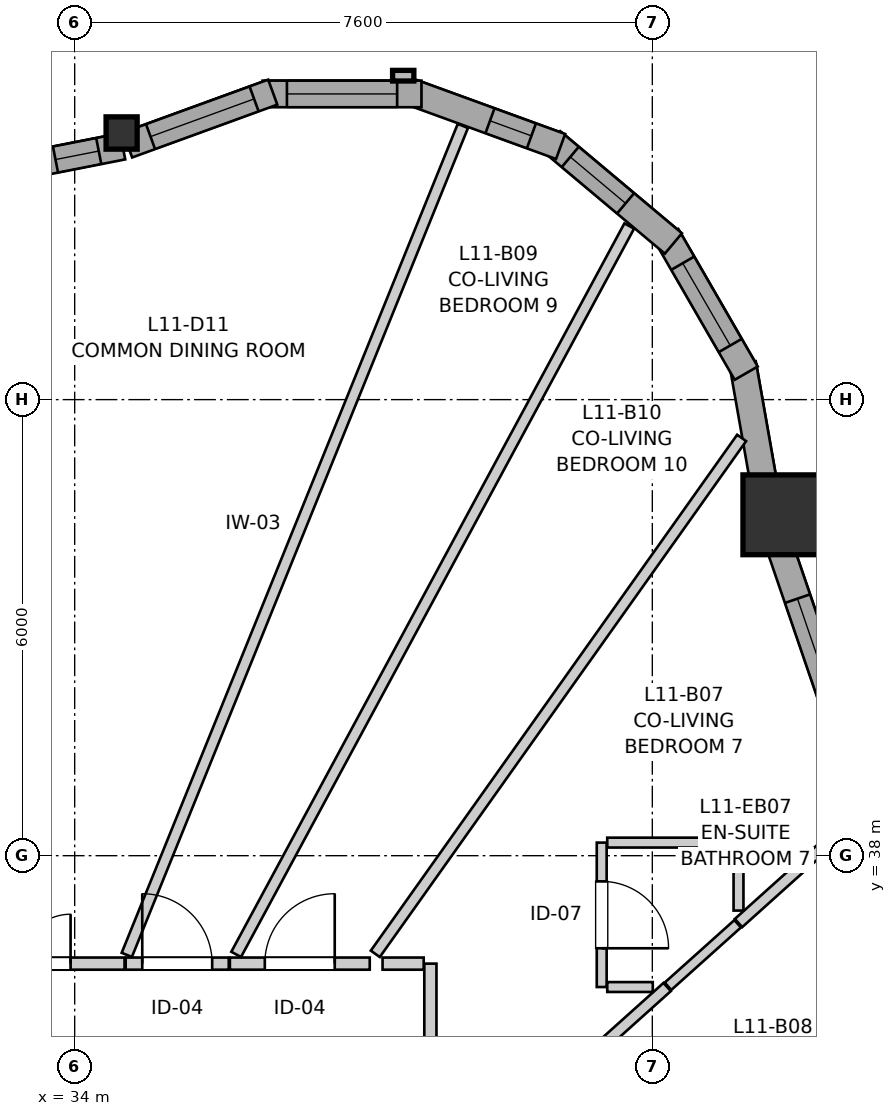
"""IFC4 building model, lengths in metres.
Left out: names, types, materials, properties, quantities, classifications, styles, units other than length and angle.
Written with IfcOpenShell. Run it as: python <this file> out.ifc"""

import sys

from ifc_helpers import new_model, si_unit, direction, frame, frame_2d, origin, origin_2d, place, context, subcontext, project, spatial, rectangle, i_section, extrude, source, transform, mapped, element, fill, save


model = new_model("IFC4")
c1 = context("Model", 3, precision=1e-05, world=origin(), true_north=direction((0.0, 1.0)))
c2 = subcontext(c1, "Body", "Model", "MODEL_VIEW")
j1 = project(units=[si_unit("LENGTHUNIT", "METRE"), si_unit("PLANEANGLEUNIT", "RADIAN")], contexts=[c1])
p1 = place(None, origin())
s1 = spatial("IfcSite", under=j1, at=p1, CompositionType="ELEMENT")
p2 = place(p1, origin())
s2 = spatial("IfcBuilding", under=s1, at=p2, CompositionType="ELEMENT")
p3 = place(p2, frame((0.0, 0.0, 39.8)))
s3 = spatial("IfcBuildingStorey", under=s2, at=p3, CompositionType="ELEMENT", Elevation=39.8)
m1 = source(origin(), c2, "Body", "SweptSolid", [
    extrude(rectangle(XDim=1.05, YDim=1.05, at=origin_2d()), origin(), (0.0, 0.0, 1.0), 2.94),
])
p4 = place(p3, frame((43.317, 42.485, 0.0), z_axis=(0.0, 0.0, 1.0), x_axis=(1.0, 0.0, 0.0)))
e1 = element("IfcColumn", 1, at=p4, inside=s3, PredefinedType="COLUMN", context=c2, shape_type="MappedRepresentation", body=[
    mapped(m1, transform((0.0, 0.0, 0.0), x_axis=(1.0, 0.0, 0.0), y_axis=(0.0, 1.0, 0.0), z_axis=(0.0, 0.0, 1.0), scale=1.0)),
])
m2 = source(origin(), c2, "Body", "SweptSolid", [
    extrude(i_section(OverallWidth=0.409, OverallDepth=0.425, WebThickness=0.03, FlangeThickness=0.048, FilletRadius=0.015, at=origin_2d()), origin(), (0.0, 0.0, 1.0), 2.94),
])
p5 = place(p3, frame((34.617, 47.508, 0.0), z_axis=(0.0, 0.0, 1.0), x_axis=(1.0, 0.0, 0.0)))
e2 = element("IfcColumn", 2, at=p5, inside=s3, PredefinedType="PILASTER", context=c2, shape_type="MappedRepresentation", body=[
    mapped(m2, transform((0.0, 0.0, 0.0), x_axis=(1.0, 0.0, 0.0), y_axis=(0.0, 1.0, 0.0), z_axis=(0.0, 0.0, 1.0), scale=1.0)),
])
p6 = place(p3, frame((44.292, 39.095, 0.0), z_axis=(0.0, 0.0, 1.0), x_axis=(-0.323582370233, 0.946200005112, 0.0)))
e3 = element("IfcWall", 3, at=p6, inside=s3, PredefinedType="SOLIDWALL", context=c2, shape_type="SweptSolid", body=[
    extrude(rectangle(XDim=3.222, YDim=0.35, at=frame_2d((1.611, 0.0))), origin(), (0.0, 0.0, 1.0), 2.42),
])
p7 = place(p6, frame((0.816, 0.0, 0.82)))
e4 = element("IfcOpeningElement", 4, at=p7, cuts=e3, PredefinedType="OPENING", context=c2, shape_type="SweptSolid", body=[
    extrude(rectangle(XDim=1.6, YDim=1.35, at=frame_2d((0.8, 0.675))), frame((0.0, 0.185, 0.0), z_axis=(0.0, -1.0, 0.0), x_axis=(1.0, 0.0, 0.0)), (0.0, 0.0, 1.0), 0.37),
])
p8 = place(p3, frame((43.093, 42.75, 0.0), z_axis=(0.0, 0.0, 1.0), x_axis=(-0.173610462023, 0.984814402553, 0.0)))
e5 = element("IfcWall", 5, at=p8, inside=s3, PredefinedType="SOLIDWALL", context=c2, shape_type="SweptSolid", body=[
    extrude(rectangle(XDim=1.752, YDim=0.35, at=frame_2d((0.876, 0.0))), origin(), (0.0, 0.0, 1.0), 2.42),
])
p9 = place(p3, frame((42.835, 44.348, 0.0), z_axis=(0.0, 0.0, 1.0), x_axis=(-0.499995423472, 0.866028046028, 0.0)))
e6 = element("IfcWall", 6, at=p9, inside=s3, PredefinedType="SOLIDWALL", context=c2, shape_type="SweptSolid", body=[
    extrude(rectangle(XDim=2.09, YDim=0.35, at=frame_2d((1.045, 0.0))), origin(), (0.0, 0.0, 1.0), 2.42),
])
p10 = place(p9, frame((0.42, 0.0, 0.82)))
e7 = element("IfcOpeningElement", 7, at=p10, cuts=e6, PredefinedType="OPENING", context=c2, shape_type="SweptSolid", body=[
    extrude(rectangle(XDim=1.25, YDim=1.35, at=frame_2d((0.625, 0.675))), frame((0.0, 0.185, 0.0), z_axis=(0.0, -1.0, 0.0), x_axis=(1.0, 0.0, 0.0)), (0.0, 0.0, 1.0), 0.37),
])
p11 = place(p3, frame((41.877, 46.054, 0.0), z_axis=(0.0, 0.0, 1.0), x_axis=(-0.766024572719, 0.642811289563, 0.0)))
e8 = element("IfcWall", 8, at=p11, inside=s3, PredefinedType="SOLIDWALL", context=c2, shape_type="SweptSolid", body=[
    extrude(rectangle(XDim=2.09, YDim=0.35, at=frame_2d((1.045, 0.0))), origin(), (0.0, 0.0, 1.0), 2.42),
])
p12 = place(p11, frame((0.821, 0.0, 0.82)))
e9 = element("IfcOpeningElement", 9, at=p12, cuts=e8, PredefinedType="OPENING", context=c2, shape_type="SweptSolid", body=[
    extrude(rectangle(XDim=0.95, YDim=1.35, at=frame_2d((0.475, 0.675))), frame((0.0, 0.185, 0.0), z_axis=(0.0, -1.0, 0.0), x_axis=(1.0, 0.0, 0.0)), (0.0, 0.0, 1.0), 0.37),
])
p13 = place(p3, frame((40.393, 47.33, 0.0), z_axis=(0.0, 0.0, 1.0), x_axis=(-0.939660353162, 0.342108784886, 0.0)))
e10 = element("IfcWall", 10, at=p13, inside=s3, PredefinedType="SOLIDWALL", context=c2, shape_type="SweptSolid", body=[
    extrude(rectangle(XDim=2.09, YDim=0.35, at=frame_2d((1.045, 0.0))), origin(), (0.0, 0.0, 1.0), 2.42),
])
p14 = place(p13, frame((0.409, 0.0, 0.82)))
e11 = element("IfcOpeningElement", 11, at=p14, cuts=e10, PredefinedType="OPENING", context=c2, shape_type="SweptSolid", body=[
    extrude(rectangle(XDim=0.58, YDim=1.35, at=frame_2d((0.29, 0.675))), frame((0.0, 0.185, 0.0), z_axis=(0.0, -1.0, 0.0), x_axis=(1.0, 0.0, 0.0)), (0.0, 0.0, 1.0), 0.37),
])
p15 = place(p3, frame((38.563, 48.022, 0.0), z_axis=(0.0, 0.0, 1.0), x_axis=(-1.0, 0.0, 0.0)))
e12 = element("IfcWall", 12, at=p15, inside=s3, PredefinedType="SOLIDWALL", context=c2, shape_type="SweptSolid", body=[
    extrude(rectangle(XDim=2.09, YDim=0.35, at=frame_2d((1.045, 0.0))), origin(), (0.0, 0.0, 1.0), 2.42),
])
p16 = place(p15, frame((0.32, 0.0, 0.82)))
e13 = element("IfcOpeningElement", 13, at=p16, cuts=e12, PredefinedType="OPENING", context=c2, shape_type="SweptSolid", body=[
    extrude(rectangle(XDim=1.45, YDim=1.25, at=frame_2d((0.725, 0.625))), frame((0.0, 0.185, 0.0), z_axis=(0.0, -1.0, 0.0), x_axis=(1.0, 0.0, 0.0)), (0.0, 0.0, 1.0), 0.37),
])
p17 = place(p3, frame((36.606, 48.045, 0.0), z_axis=(0.0, 0.0, 1.0), x_axis=(-0.939653047052, -0.342128851701, 0.0)))
e14 = element("IfcWall", 14, at=p17, inside=s3, PredefinedType="SOLIDWALL", context=c2, shape_type="SweptSolid", body=[
    extrude(rectangle(XDim=2.032, YDim=0.35, at=frame_2d((1.016, 0.0))), origin(), (0.0, 0.0, 1.0), 2.42),
])
p18 = place(p17, frame((0.261, 0.0, 0.82)))
e15 = element("IfcOpeningElement", 15, at=p18, cuts=e14, PredefinedType="OPENING", context=c2, shape_type="SweptSolid", body=[
    extrude(rectangle(XDim=1.45, YDim=1.25, at=frame_2d((0.725, 0.625))), frame((0.0, 0.185, 0.0), z_axis=(0.0, -1.0, 0.0), x_axis=(1.0, 0.0, 0.0)), (0.0, 0.0, 1.0), 0.37),
])
p19 = place(p3, frame((34.632, 47.332, 0.0), z_axis=(0.0, 0.0, 1.0), x_axis=(-0.981234691866, -0.192817217796, 0.0)))
e16 = element("IfcWall", 16, at=p19, inside=s3, PredefinedType="SOLIDWALL", context=c2, shape_type="SweptSolid", body=[
    extrude(rectangle(XDim=3.502, YDim=0.35, at=frame_2d((1.751, 0.0))), origin(), (0.0, 0.0, 1.0), 2.42),
])
p20 = place(p19, frame((0.321, 0.0, 0.82)))
e17 = element("IfcOpeningElement", 17, at=p20, cuts=e16, PredefinedType="OPENING", context=c2, shape_type="SweptSolid", body=[
    extrude(rectangle(XDim=0.58, YDim=1.35, at=frame_2d((0.29, 0.675))), frame((0.0, 0.185, 0.0), z_axis=(0.0, -1.0, 0.0), x_axis=(1.0, 0.0, 0.0)), (0.0, 0.0, 1.0), 0.37),
])
p21 = place(p19, frame((1.567, 0.0, 0.82)))
e18 = element("IfcOpeningElement", 18, at=p21, cuts=e16, PredefinedType="OPENING", context=c2, shape_type="SweptSolid", body=[
    extrude(rectangle(XDim=1.45, YDim=1.25, at=frame_2d((0.725, 0.625))), frame((0.0, 0.185, 0.0), z_axis=(0.0, -1.0, 0.0), x_axis=(1.0, 0.0, 0.0)), (0.0, 0.0, 1.0), 0.37),
])
p22 = place(p3, frame((38.68, 36.58, 0.0), z_axis=(0.0, 0.0, 1.0), x_axis=(0.0, -1.0, 0.0)))
e19 = element("IfcWall", 19, at=p22, inside=s3, PredefinedType="PARTITIONING", context=c2, shape_type="SweptSolid", body=[
    extrude(rectangle(XDim=3.069, YDim=0.16, at=frame_2d((1.535, 0.0))), origin(), (0.0, 0.0, 1.0), 2.94),
])
p23 = place(p22, frame((1.092, 0.0, 0.0)))
e20 = element("IfcOpeningElement", 20, at=p23, cuts=e19, PredefinedType="OPENING", context=c2, shape_type="SweptSolid", body=[
    extrude(rectangle(XDim=0.92, YDim=2.1, at=frame_2d((0.46, 1.05))), frame((0.0, 0.09, 0.0), z_axis=(0.0, -1.0, 0.0), x_axis=(1.0, 0.0, 0.0)), (0.0, 0.0, 1.0), 0.18),
])
p24 = place(p3, frame((31.938, 36.58, 0.0), z_axis=(0.0, 0.0, 1.0), x_axis=(1.0, 0.0, 0.0)))
e21 = element("IfcWall", 21, at=p24, inside=s3, PredefinedType="PARTITIONING", context=c2, shape_type="SweptSolid", body=[
    extrude(rectangle(XDim=2.718, YDim=0.16, at=frame_2d((1.359, 0.0))), origin(), (0.0, 0.0, 1.0), 2.94),
])
p25 = place(p24, frame((0.708, 0.0, 0.0)))
e22 = element("IfcOpeningElement", 22, at=p25, cuts=e21, PredefinedType="OPENING", context=c2, shape_type="SweptSolid", body=[
    extrude(rectangle(XDim=1.3, YDim=2.1, at=frame_2d((0.65, 1.05))), frame((0.0, 0.09, 0.0), z_axis=(0.0, -1.0, 0.0), x_axis=(1.0, 0.0, 0.0)), (0.0, 0.0, 1.0), 0.18),
])
p26 = place(p3, frame((40.934, 38.172, 0.0), z_axis=(0.0, 0.0, 1.0), x_axis=(0.0, -1.0, 0.0)))
e23 = element("IfcWall", 23, at=p26, inside=s3, PredefinedType="PARTITIONING", context=c2, shape_type="SweptSolid", body=[
    extrude(rectangle(XDim=1.9, YDim=0.13, at=frame_2d((0.95, 0.0))), origin(), (0.0, 0.0, 1.0), 2.94),
])
p27 = place(p26, frame((0.51, 0.0, 0.0)))
e24 = element("IfcOpeningElement", 24, at=p27, cuts=e23, PredefinedType="OPENING", context=c2, shape_type="SweptSolid", body=[
    extrude(rectangle(XDim=0.88, YDim=2.05, at=frame_2d((0.44, 1.025))), frame((0.0, 0.075, 0.0), z_axis=(0.0, -1.0, 0.0), x_axis=(1.0, 0.0, 0.0)), (0.0, 0.0, 1.0), 0.15),
])
p28 = place(p3, frame((36.042, 36.58, 0.0), z_axis=(0.0, 0.0, 1.0), x_axis=(1.0, 0.0, 0.0)))
e25 = element("IfcWall", 25, at=p28, inside=s3, PredefinedType="PARTITIONING", context=c2, shape_type="SweptSolid", body=[
    extrude(rectangle(XDim=1.84, YDim=0.16, at=frame_2d((0.92, 0.0))), origin(), (0.0, 0.0, 1.0), 2.94),
])
p29 = place(p28, frame((0.459, 0.0, 0.0)))
e26 = element("IfcOpeningElement", 26, at=p29, cuts=e25, PredefinedType="OPENING", context=c2, shape_type="SweptSolid", body=[
    extrude(rectangle(XDim=0.92, YDim=2.1, at=frame_2d((0.46, 1.05))), frame((0.0, 0.09, 0.0), z_axis=(0.0, -1.0, 0.0), x_axis=(1.0, 0.0, 0.0)), (0.0, 0.0, 1.0), 0.18),
])
p30 = place(p3, frame((34.671, 36.58, 0.0), z_axis=(0.0, 0.0, 1.0), x_axis=(1.0, 0.0, 0.0)))
e27 = element("IfcWall", 27, at=p30, inside=s3, PredefinedType="PARTITIONING", context=c2, shape_type="SweptSolid", body=[
    extrude(rectangle(XDim=1.356, YDim=0.16, at=frame_2d((0.678, 0.0))), origin(), (0.0, 0.0, 1.0), 2.94),
])
p31 = place(p30, frame((0.218, 0.0, 0.0)))
e28 = element("IfcOpeningElement", 28, at=p31, cuts=e27, PredefinedType="OPENING", context=c2, shape_type="SweptSolid", body=[
    extrude(rectangle(XDim=0.92, YDim=2.1, at=frame_2d((0.46, 1.05))), frame((0.0, 0.09, 0.0), z_axis=(0.0, -1.0, 0.0), x_axis=(1.0, 0.0, 0.0)), (0.0, 0.0, 1.0), 0.18),
])
p32 = place(p3, frame((34.686, 36.695, 0.0), z_axis=(0.0, 0.0, 1.0), x_axis=(0.375735926904, 0.926726773776, 0.0)))
e29 = element("IfcWall", 29, at=p32, inside=s3, PredefinedType="PARTITIONING", context=c2, shape_type="SweptSolid", body=[
    extrude(rectangle(XDim=11.769, YDim=0.145, at=frame_2d((5.884, 0.0))), origin(), (0.0, 0.0, 1.0), 2.94),
])
p33 = place(p3, frame((36.125, 36.701, 0.0), z_axis=(0.0, 0.0, 1.0), x_axis=(0.474948586069, 0.880013545686, 0.0)))
e30 = element("IfcWall", 30, at=p33, inside=s3, PredefinedType="PARTITIONING", context=c2, shape_type="SweptSolid", body=[
    extrude(rectangle(XDim=10.889, YDim=0.145, at=frame_2d((5.445, 0.0))), origin(), (0.0, 0.0, 1.0), 2.94),
])
p34 = place(p3, frame((37.955, 36.708, 0.0), z_axis=(0.0, 0.0, 1.0), x_axis=(0.578991718582, 0.81533342248, 0.0)))
e31 = element("IfcWall", 31, at=p34, inside=s3, PredefinedType="PARTITIONING", context=c2, shape_type="SweptSolid", body=[
    extrude(rectangle(XDim=8.325, YDim=0.145, at=frame_2d((4.163, 0.0))), origin(), (0.0, 0.0, 1.0), 2.94),
])
p35 = place(p3, frame((38.814, 33.597, 0.0), z_axis=(0.0, 0.0, 1.0), x_axis=(0.74417856937, 0.667980730927, 0.0)))
e32 = element("IfcWall", 32, at=p35, inside=s3, PredefinedType="PARTITIONING", context=c2, shape_type="SweptSolid", body=[
    extrude(rectangle(XDim=4.005, YDim=0.145, at=frame_2d((2.002, 0.0))), origin(), (0.0, 0.0, 1.0), 2.94),
])
p36 = place(p3, frame((42.734, 37.114, 0.0), z_axis=(0.0, 0.0, 1.0), x_axis=(0.743962922365, 0.668220899214, 0.0)))
e33 = element("IfcWall", 33, at=p36, inside=s3, PredefinedType="PARTITIONING", context=c2, shape_type="SweptSolid", body=[
    extrude(rectangle(XDim=2.05, YDim=0.145, at=frame_2d((1.025, 0.0))), origin(), (0.0, 0.0, 1.0), 2.94),
])
p37 = place(p3, frame((41.007, 38.172, 0.0), z_axis=(0.0, 0.0, 1.0), x_axis=(1.0, 0.0, 0.0)))
e34 = element("IfcWall", 34, at=p37, inside=s3, PredefinedType="PARTITIONING", context=c2, shape_type="SweptSolid", body=[
    extrude(rectangle(XDim=1.727, YDim=0.13, at=frame_2d((0.863, 0.0))), origin(), (0.0, 0.0, 1.0), 2.94),
])
p38 = place(p3, frame((41.806, 36.282, 0.0), z_axis=(0.0, 0.0, 1.0), x_axis=(0.744525261569, 0.667594289135, 0.0)))
e35 = element("IfcWall", 35, at=p38, inside=s3, PredefinedType="PARTITIONING", context=c2, shape_type="SweptSolid", body=[
    extrude(rectangle(XDim=1.231, YDim=0.13, at=frame_2d((0.616, 0.0))), origin(), (0.0, 0.0, 1.0), 2.94),
])
p39 = place(p3, frame((42.734, 37.278, 0.0), z_axis=(0.0, 0.0, 1.0), x_axis=(0.0, 1.0, 0.0)))
e36 = element("IfcWall", 36, at=p39, inside=s3, PredefinedType="PARTITIONING", context=c2, shape_type="SweptSolid", body=[
    extrude(rectangle(XDim=0.821, YDim=0.13, at=frame_2d((0.411, 0.0))), origin(), (0.0, 0.0, 1.0), 2.94),
])
p40 = place(p3, frame((41.007, 36.272, 0.0), z_axis=(0.0, 0.0, 1.0), x_axis=(1.0, 0.0, 0.0)))
e37 = element("IfcWall", 37, at=p40, inside=s3, PredefinedType="PARTITIONING", context=c2, shape_type="SweptSolid", body=[
    extrude(rectangle(XDim=0.599, YDim=0.13, at=frame_2d((0.299, 0.0))), origin(), (0.0, 0.0, 1.0), 2.94),
])
p41 = place(p3, frame((38.051, 36.58, 0.0), z_axis=(0.0, 0.0, 1.0), x_axis=(1.0, 0.0, 0.0)))
e38 = element("IfcWall", 38, at=p41, inside=s3, PredefinedType="PARTITIONING", context=c2, shape_type="SweptSolid", body=[
    extrude(rectangle(XDim=0.541, YDim=0.16, at=frame_2d((0.271, 0.0))), origin(), (0.0, 0.0, 1.0), 2.94),
])
m3 = source(origin(), c2, "Body", "SweptSolid", [
    extrude(rectangle(XDim=1.6, YDim=1.35, at=frame_2d((0.8, 0.675))), frame((0.0, 0.03, 0.0), z_axis=(0.0, -1.0, 0.0), x_axis=(1.0, 0.0, 0.0)), (0.0, 0.0, 1.0), 0.06),
])
p42 = place(p7, origin())
e39 = element("IfcWindow", 39, at=p42, inside=s3, PartitioningType="SINGLE_PANEL", PredefinedType="WINDOW", context=c2, shape_type="MappedRepresentation", body=[
    mapped(m3, transform((0.0, 0.0, 0.0), x_axis=(1.0, 0.0, 0.0), y_axis=(0.0, 1.0, 0.0), z_axis=(0.0, 0.0, 1.0), scale=1.0)),
])
fill(e4, e39)
m4 = source(origin(), c2, "Body", "SweptSolid", [
    extrude(rectangle(XDim=1.25, YDim=1.35, at=frame_2d((0.625, 0.675))), frame((0.0, 0.03, 0.0), z_axis=(0.0, -1.0, 0.0), x_axis=(1.0, 0.0, 0.0)), (0.0, 0.0, 1.0), 0.06),
])
p43 = place(p10, origin())
e40 = element("IfcWindow", 40, at=p43, inside=s3, PartitioningType="SINGLE_PANEL", PredefinedType="WINDOW", context=c2, shape_type="MappedRepresentation", body=[
    mapped(m4, transform((0.0, 0.0, 0.0), x_axis=(1.0, 0.0, 0.0), y_axis=(0.0, 1.0, 0.0), z_axis=(0.0, 0.0, 1.0), scale=1.0)),
])
fill(e7, e40)
m5 = source(origin(), c2, "Body", "SweptSolid", [
    extrude(rectangle(XDim=0.95, YDim=1.35, at=frame_2d((0.475, 0.675))), frame((0.0, 0.03, 0.0), z_axis=(0.0, -1.0, 0.0), x_axis=(1.0, 0.0, 0.0)), (0.0, 0.0, 1.0), 0.06),
])
p44 = place(p12, origin())
e41 = element("IfcWindow", 41, at=p44, inside=s3, PartitioningType="SINGLE_PANEL", PredefinedType="WINDOW", context=c2, shape_type="MappedRepresentation", body=[
    mapped(m5, transform((0.0, 0.0, 0.0), x_axis=(1.0, 0.0, 0.0), y_axis=(0.0, 1.0, 0.0), z_axis=(0.0, 0.0, 1.0), scale=1.0)),
])
fill(e9, e41)
m6 = source(origin(), c2, "Body", "SweptSolid", [
    extrude(rectangle(XDim=0.58, YDim=1.35, at=frame_2d((0.29, 0.675))), frame((0.0, 0.03, 0.0), z_axis=(0.0, -1.0, 0.0), x_axis=(1.0, 0.0, 0.0)), (0.0, 0.0, 1.0), 0.06),
])
p45 = place(p14, origin())
e42 = element("IfcWindow", 42, at=p45, inside=s3, PartitioningType="SINGLE_PANEL", PredefinedType="WINDOW", context=c2, shape_type="MappedRepresentation", body=[
    mapped(m6, transform((0.0, 0.0, 0.0), x_axis=(1.0, 0.0, 0.0), y_axis=(0.0, 1.0, 0.0), z_axis=(0.0, 0.0, 1.0), scale=1.0)),
])
fill(e11, e42)
m7 = source(origin(), c2, "Body", "SweptSolid", [
    extrude(rectangle(XDim=1.45, YDim=1.25, at=frame_2d((0.725, 0.625))), frame((0.0, 0.03, 0.0), z_axis=(0.0, -1.0, 0.0), x_axis=(1.0, 0.0, 0.0)), (0.0, 0.0, 1.0), 0.06),
])
p46 = place(p16, origin())
e43 = element("IfcWindow", 43, at=p46, inside=s3, PartitioningType="SINGLE_PANEL", PredefinedType="WINDOW", context=c2, shape_type="MappedRepresentation", body=[
    mapped(m7, transform((0.0, 0.0, 0.0), x_axis=(1.0, 0.0, 0.0), y_axis=(0.0, 1.0, 0.0), z_axis=(0.0, 0.0, 1.0), scale=1.0)),
])
fill(e13, e43)
p47 = place(p18, origin())
e44 = element("IfcWindow", 44, at=p47, inside=s3, PartitioningType="SINGLE_PANEL", PredefinedType="WINDOW", context=c2, shape_type="MappedRepresentation", body=[
    mapped(m7, transform((0.0, 0.0, 0.0), x_axis=(1.0, 0.0, 0.0), y_axis=(0.0, 1.0, 0.0), z_axis=(0.0, 0.0, 1.0), scale=1.0)),
])
fill(e15, e44)
p48 = place(p20, origin())
e45 = element("IfcWindow", 45, at=p48, inside=s3, PartitioningType="SINGLE_PANEL", PredefinedType="WINDOW", context=c2, shape_type="MappedRepresentation", body=[
    mapped(m6, transform((0.0, 0.0, 0.0), x_axis=(1.0, 0.0, 0.0), y_axis=(0.0, 1.0, 0.0), z_axis=(0.0, 0.0, 1.0), scale=1.0)),
])
fill(e17, e45)
m8 = source(origin(), c2, "Body", "SweptSolid", [
    extrude(rectangle(XDim=1.3, YDim=2.1, at=frame_2d((0.65, 1.05))), frame((0.0, 0.025, 0.0), z_axis=(0.0, -1.0, 0.0), x_axis=(1.0, 0.0, 0.0)), (0.0, 0.0, 1.0), 0.05),
])
p49 = place(p25, origin())
e46 = element("IfcDoor", 46, at=p49, inside=s3, OperationType="DOUBLE_DOOR_SINGLE_SWING", PredefinedType="DOOR", context=c2, shape_type="MappedRepresentation", body=[
    mapped(m8, transform((0.0, 0.0, 0.0), x_axis=(1.0, 0.0, 0.0), y_axis=(0.0, 1.0, 0.0), z_axis=(0.0, 0.0, 1.0), scale=1.0)),
])
fill(e22, e46)
m9 = source(origin(), c2, "Body", "SweptSolid", [
    extrude(rectangle(XDim=0.88, YDim=2.05, at=frame_2d((0.44, 1.025))), frame((0.0, 0.025, 0.0), z_axis=(0.0, -1.0, 0.0), x_axis=(1.0, 0.0, 0.0)), (0.0, 0.0, 1.0), 0.05),
])
p50 = place(p27, origin())
e47 = element("IfcDoor", 47, at=p50, inside=s3, OperationType="SINGLE_SWING_RIGHT", PredefinedType="DOOR", context=c2, shape_type="MappedRepresentation", body=[
    mapped(m9, transform((0.0, 0.0, 0.0), x_axis=(1.0, 0.0, 0.0), y_axis=(0.0, 1.0, 0.0), z_axis=(0.0, 0.0, 1.0), scale=1.0)),
])
fill(e24, e47)
m10 = source(origin(), c2, "Body", "SweptSolid", [
    extrude(rectangle(XDim=0.92, YDim=2.1, at=frame_2d((0.46, 1.05))), frame((0.0, 0.025, 0.0), z_axis=(0.0, -1.0, 0.0), x_axis=(1.0, 0.0, 0.0)), (0.0, 0.0, 1.0), 0.05),
])
p51 = place(p29, origin())
e48 = element("IfcDoor", 48, at=p51, inside=s3, OperationType="SINGLE_SWING_RIGHT", PredefinedType="DOOR", context=c2, shape_type="MappedRepresentation", body=[
    mapped(m10, transform((0.0, 0.0, 0.0), x_axis=(1.0, 0.0, 0.0), y_axis=(0.0, 1.0, 0.0), z_axis=(0.0, 0.0, 1.0), scale=1.0)),
])
fill(e26, e48)
p52 = place(p31, origin())
e49 = element("IfcDoor", 49, at=p52, inside=s3, OperationType="SINGLE_SWING_LEFT", PredefinedType="DOOR", context=c2, shape_type="MappedRepresentation", body=[
    mapped(m10, transform((0.0, 0.0, 0.0), x_axis=(1.0, 0.0, 0.0), y_axis=(0.0, 1.0, 0.0), z_axis=(0.0, 0.0, 1.0), scale=1.0)),
])
fill(e28, e49)
save(model, sys.argv[1])
